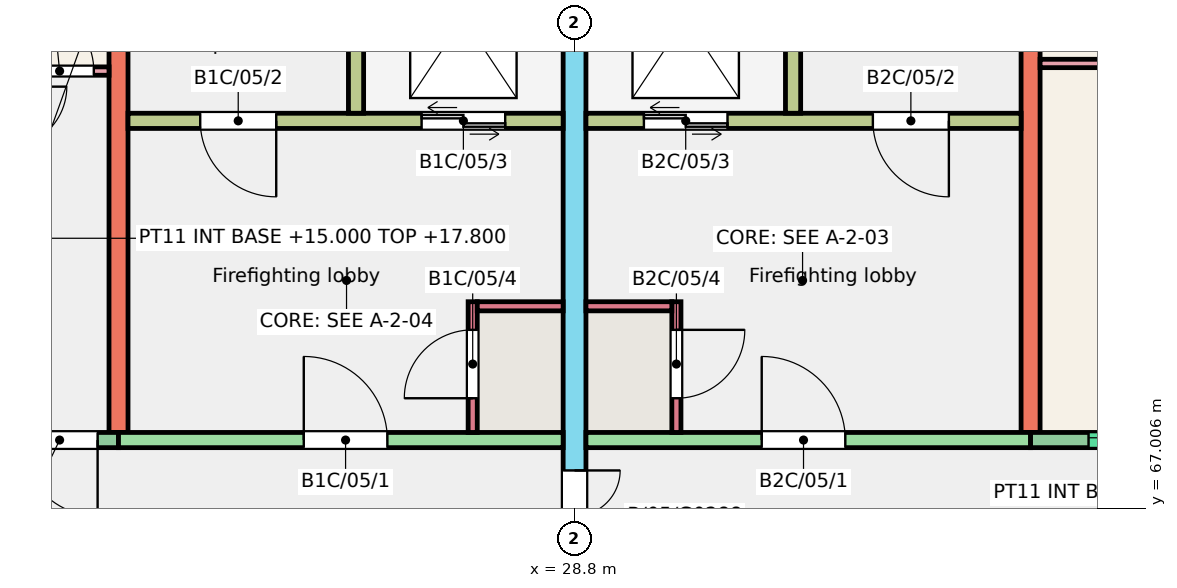
"""IFC4 building model, lengths in metres.
Left out: names, types, materials, properties, quantities, classifications, styles, units other than length and angle.
Written with IfcOpenShell. Run it as: python <this file> out.ifc"""

import sys

from ifc_helpers import new_model, si_unit, direction, frame, frame_2d, origin, place, context, subcontext, project, spatial, rectangle, extrude, element, fill, save


model = new_model("IFC4")
c1 = context("Model", 3, precision=1e-05, world=origin(), true_north=direction((0.0, 1.0)))
c2 = subcontext(c1, "Body", "Model", "MODEL_VIEW")
j1 = project(units=[si_unit("LENGTHUNIT", "METRE"), si_unit("PLANEANGLEUNIT", "RADIAN")], contexts=[c1])
p1 = place(None, origin())
s1 = spatial("IfcSite", under=j1, at=p1, CompositionType="ELEMENT")
p2 = place(p1, origin())
s2 = spatial("IfcBuilding", under=s1, at=p2, CompositionType="ELEMENT")
p3 = place(p2, frame((0.0, 0.0, 15.0)))
s3 = spatial("IfcBuildingStorey", under=s2, at=p3, CompositionType="ELEMENT", Elevation=15.0)
p4 = place(p3, frame((22.8, 68.0, 0.0), z_axis=(0.0, 0.0, 1.0), x_axis=(0.0, 1.0, 0.0)))
e1 = element("IfcWall", 1, at=p4, inside=s3, PredefinedType="SHEAR", context=c2, shape_type="SweptSolid", body=[
    extrude(rectangle(XDim=9.0, YDim=0.25, at=frame_2d((4.5, 0.0))), origin(), (0.0, 0.0, 1.0), 3.0),
])
p5 = place(p3, frame((28.8, 66.0, 0.0), z_axis=(0.0, 0.0, 1.0), x_axis=(0.0, 1.0, 0.0)))
e2 = element("IfcWall", 2, at=p5, inside=s3, PredefinedType="SHEAR", context=c2, shape_type="SweptSolid", body=[
    extrude(rectangle(XDim=11.0, YDim=0.3, at=frame_2d((5.5, 0.0))), origin(), (0.0, 0.0, 1.0), 3.0),
])
p6 = place(p5, frame((0.3, 0.0, 0.0)))
e3 = element("IfcOpeningElement", 3, at=p6, cuts=e2, PredefinedType="OPENING", context=c2, shape_type="SweptSolid", body=[
    extrude(rectangle(XDim=1.2, YDim=2.1, at=frame_2d((0.6, 1.05))), frame((0.0, 0.16, 0.0), z_axis=(0.0, -1.0, 0.0), x_axis=(1.0, 0.0, 0.0)), (0.0, 0.0, 1.0), 0.32),
])
p7 = place(p3, frame((34.8, 68.0, 0.0), z_axis=(0.0, 0.0, 1.0), x_axis=(0.0, 1.0, 0.0)))
e4 = element("IfcWall", 4, at=p7, inside=s3, PredefinedType="SHEAR", context=c2, shape_type="SweptSolid", body=[
    extrude(rectangle(XDim=9.0, YDim=0.25, at=frame_2d((4.5, 0.0))), origin(), (0.0, 0.0, 1.0), 3.0),
])
p8 = place(p3, frame((19.2, 67.9, 0.0), z_axis=(0.0, 0.0, 1.0), x_axis=(1.0, 0.0, 0.0)))
e5 = element("IfcWall", 5, at=p8, inside=s3, PredefinedType="SOLIDWALL", context=c2, shape_type="SweptSolid", body=[
    extrude(rectangle(XDim=3.6, YDim=0.2, at=frame_2d((1.8, 0.0))), origin(), (0.0, 0.0, 1.0), 3.0),
])
p9 = place(p8, frame((0.482, 0.0, 1.1)))
e6 = element("IfcOpeningElement", 6, at=p9, cuts=e5, PredefinedType="OPENING", context=c2, shape_type="SweptSolid", body=[
    extrude(rectangle(XDim=1.2, YDim=1.3, at=frame_2d((0.6, 0.65))), frame((0.0, 0.11, 0.0), z_axis=(0.0, -1.0, 0.0), x_axis=(1.0, 0.0, 0.0)), (0.0, 0.0, 1.0), 0.22),
])
p10 = place(p8, frame((2.325, 0.0, 0.0)))
e7 = element("IfcOpeningElement", 7, at=p10, cuts=e5, PredefinedType="OPENING", context=c2, shape_type="SweptSolid", body=[
    extrude(rectangle(XDim=1.0, YDim=2.1, at=frame_2d((0.5, 1.05))), frame((0.0, 0.11, 0.0), z_axis=(0.0, -1.0, 0.0), x_axis=(1.0, 0.0, 0.0)), (0.0, 0.0, 1.0), 0.22),
])
p11 = place(p3, frame((22.8, 67.9, 0.0), z_axis=(0.0, 0.0, 1.0), x_axis=(1.0, 0.0, 0.0)))
e8 = element("IfcWall", 8, at=p11, inside=s3, PredefinedType="SHEAR", context=c2, shape_type="SweptSolid", body=[
    extrude(rectangle(XDim=5.85, YDim=0.2, at=frame_2d((2.925, 0.0))), origin(), (0.0, 0.0, 1.0), 3.0),
])
p12 = place(p11, frame((2.438, 0.0, 0.0)))
e9 = element("IfcOpeningElement", 9, at=p12, cuts=e8, PredefinedType="OPENING", context=c2, shape_type="SweptSolid", body=[
    extrude(rectangle(XDim=1.1, YDim=2.1, at=frame_2d((0.55, 1.05))), frame((0.0, 0.11, 0.0), z_axis=(0.0, -1.0, 0.0), x_axis=(1.0, 0.0, 0.0)), (0.0, 0.0, 1.0), 0.22),
])
p13 = place(p3, frame((22.925, 72.1, 0.0), z_axis=(0.0, 0.0, 1.0), x_axis=(1.0, 0.0, 0.0)))
e10 = element("IfcWall", 10, at=p13, inside=s3, PredefinedType="SHEAR", context=c2, shape_type="SweptSolid", body=[
    extrude(rectangle(XDim=5.725, YDim=0.2, at=frame_2d((2.862, 0.0))), origin(), (0.0, 0.0, 1.0), 3.0),
])
p14 = place(p13, frame((0.95, 0.0, 0.0)))
e11 = element("IfcOpeningElement", 11, at=p14, cuts=e10, PredefinedType="OPENING", context=c2, shape_type="SweptSolid", body=[
    extrude(rectangle(XDim=1.0, YDim=2.1, at=frame_2d((0.5, 1.05))), frame((0.0, 0.11, 0.0), z_axis=(0.0, -1.0, 0.0), x_axis=(1.0, 0.0, 0.0)), (0.0, 0.0, 1.0), 0.22),
])
p15 = place(p13, frame((3.863, 0.0, 0.0)))
e12 = element("IfcOpeningElement", 12, at=p15, cuts=e10, PredefinedType="OPENING", context=c2, shape_type="SweptSolid", body=[
    extrude(rectangle(XDim=1.1, YDim=2.1, at=frame_2d((0.55, 1.05))), frame((0.0, 0.11, 0.0), z_axis=(0.0, -1.0, 0.0), x_axis=(1.0, 0.0, 0.0)), (0.0, 0.0, 1.0), 0.22),
])
p16 = place(p3, frame((25.925, 72.2, 0.0), z_axis=(0.0, 0.0, 1.0), x_axis=(0.0, 1.0, 0.0)))
e13 = element("IfcWall", 13, at=p16, inside=s3, PredefinedType="SHEAR", context=c2, shape_type="SweptSolid", body=[
    extrude(rectangle(XDim=4.8, YDim=0.2, at=frame_2d((2.4, 0.0))), origin(), (0.0, 0.0, 1.0), 3.0),
])
p17 = place(p3, frame((27.46, 68.0, 0.0), z_axis=(0.0, 0.0, 1.0), x_axis=(0.0, 1.0, 0.0)))
e14 = element("IfcWall", 14, at=p17, inside=s3, PredefinedType="SHEAR", context=c2, shape_type="SweptSolid", body=[
    extrude(rectangle(XDim=1.72, YDim=0.12, at=frame_2d((0.86, 0.0))), origin(), (0.0, 0.0, 1.0), 3.0),
])
p18 = place(p17, frame((0.45, 0.0, 0.0)))
e15 = element("IfcOpeningElement", 15, at=p18, cuts=e14, PredefinedType="OPENING", context=c2, shape_type="SweptSolid", body=[
    extrude(rectangle(XDim=0.9, YDim=2.1, at=frame_2d((0.45, 1.05))), frame((0.0, 0.07, 0.0), z_axis=(0.0, -1.0, 0.0), x_axis=(1.0, 0.0, 0.0)), (0.0, 0.0, 1.0), 0.14),
])
p19 = place(p3, frame((27.52, 69.66, 0.0), z_axis=(0.0, 0.0, 1.0), x_axis=(1.0, 0.0, 0.0)))
e16 = element("IfcWall", 16, at=p19, inside=s3, PredefinedType="SHEAR", context=c2, shape_type="SweptSolid", body=[
    extrude(rectangle(XDim=1.13, YDim=0.12, at=frame_2d((0.565, 0.0))), origin(), (0.0, 0.0, 1.0), 3.0),
])
p20 = place(p3, frame((28.95, 67.9, 0.0), z_axis=(0.0, 0.0, 1.0), x_axis=(1.0, 0.0, 0.0)))
e17 = element("IfcWall", 17, at=p20, inside=s3, PredefinedType="SHEAR", context=c2, shape_type="SweptSolid", body=[
    extrude(rectangle(XDim=5.85, YDim=0.2, at=frame_2d((2.925, 0.0))), origin(), (0.0, 0.0, 1.0), 3.0),
])
p21 = place(p20, frame((2.312, 0.0, 0.0)))
e18 = element("IfcOpeningElement", 18, at=p21, cuts=e17, PredefinedType="OPENING", context=c2, shape_type="SweptSolid", body=[
    extrude(rectangle(XDim=1.1, YDim=2.1, at=frame_2d((0.55, 1.05))), frame((0.0, 0.11, 0.0), z_axis=(0.0, -1.0, 0.0), x_axis=(1.0, 0.0, 0.0)), (0.0, 0.0, 1.0), 0.22),
])
p22 = place(p3, frame((28.95, 72.1, 0.0), z_axis=(0.0, 0.0, 1.0), x_axis=(1.0, 0.0, 0.0)))
e19 = element("IfcWall", 19, at=p22, inside=s3, PredefinedType="SHEAR", context=c2, shape_type="SweptSolid", body=[
    extrude(rectangle(XDim=5.725, YDim=0.2, at=frame_2d((2.863, 0.0))), origin(), (0.0, 0.0, 1.0), 3.0),
])
p23 = place(p22, frame((3.775, 0.0, 0.0)))
e20 = element("IfcOpeningElement", 20, at=p23, cuts=e19, PredefinedType="OPENING", context=c2, shape_type="SweptSolid", body=[
    extrude(rectangle(XDim=1.0, YDim=2.1, at=frame_2d((0.5, 1.05))), frame((0.0, 0.11, 0.0), z_axis=(0.0, -1.0, 0.0), x_axis=(1.0, 0.0, 0.0)), (0.0, 0.0, 1.0), 0.22),
])
p24 = place(p22, frame((0.762, 0.0, 0.0)))
e21 = element("IfcOpeningElement", 21, at=p24, cuts=e19, PredefinedType="OPENING", context=c2, shape_type="SweptSolid", body=[
    extrude(rectangle(XDim=1.1, YDim=2.1, at=frame_2d((0.55, 1.05))), frame((0.0, 0.11, 0.0), z_axis=(0.0, -1.0, 0.0), x_axis=(1.0, 0.0, 0.0)), (0.0, 0.0, 1.0), 0.22),
])
p25 = place(p3, frame((31.675, 72.2, 0.0), z_axis=(0.0, 0.0, 1.0), x_axis=(0.0, 1.0, 0.0)))
e22 = element("IfcWall", 22, at=p25, inside=s3, PredefinedType="SHEAR", context=c2, shape_type="SweptSolid", body=[
    extrude(rectangle(XDim=4.8, YDim=0.2, at=frame_2d((2.4, 0.0))), origin(), (0.0, 0.0, 1.0), 3.0),
])
p26 = place(p3, frame((30.14, 68.0, 0.0), z_axis=(0.0, 0.0, 1.0), x_axis=(0.0, 1.0, 0.0)))
e23 = element("IfcWall", 23, at=p26, inside=s3, PredefinedType="SHEAR", context=c2, shape_type="SweptSolid", body=[
    extrude(rectangle(XDim=1.72, YDim=0.12, at=frame_2d((0.86, 0.0))), origin(), (0.0, 0.0, 1.0), 3.0),
])
p27 = place(p26, frame((0.45, 0.0, 0.0)))
e24 = element("IfcOpeningElement", 24, at=p27, cuts=e23, PredefinedType="OPENING", context=c2, shape_type="SweptSolid", body=[
    extrude(rectangle(XDim=0.9, YDim=2.1, at=frame_2d((0.45, 1.05))), frame((0.0, 0.07, 0.0), z_axis=(0.0, -1.0, 0.0), x_axis=(1.0, 0.0, 0.0)), (0.0, 0.0, 1.0), 0.14),
])
p28 = place(p3, frame((28.95, 69.66, 0.0), z_axis=(0.0, 0.0, 1.0), x_axis=(1.0, 0.0, 0.0)))
e25 = element("IfcWall", 25, at=p28, inside=s3, PredefinedType="SHEAR", context=c2, shape_type="SweptSolid", body=[
    extrude(rectangle(XDim=1.13, YDim=0.12, at=frame_2d((0.565, 0.0))), origin(), (0.0, 0.0, 1.0), 3.0),
])
p29 = place(p3, frame((34.8, 67.9, 0.0), z_axis=(0.0, 0.0, 1.0), x_axis=(1.0, 0.0, 0.0)))
e26 = element("IfcWall", 26, at=p29, inside=s3, PredefinedType="SOLIDWALL", context=c2, shape_type="SweptSolid", body=[
    extrude(rectangle(XDim=3.6, YDim=0.2, at=frame_2d((1.8, 0.0))), origin(), (0.0, 0.0, 1.0), 3.0),
])
p30 = place(p29, frame((0.762, 0.0, 1.2)))
e27 = element("IfcOpeningElement", 27, at=p30, cuts=e26, PredefinedType="OPENING", context=c2, shape_type="SweptSolid", body=[
    extrude(rectangle(XDim=2.1, YDim=1.2, at=frame_2d((1.05, 0.6))), frame((0.0, 0.11, 0.0), z_axis=(0.0, -1.0, 0.0), x_axis=(1.0, 0.0, 0.0)), (0.0, 0.0, 1.0), 0.22),
])
p31 = place(p3, frame((19.3, 72.755, 0.0), z_axis=(0.0, 0.0, 1.0), x_axis=(1.0, 0.0, 0.0)))
e28 = element("IfcWall", 28, at=p31, inside=s3, PredefinedType="PARTITIONING", context=c2, shape_type="SweptSolid", body=[
    extrude(rectangle(XDim=3.375, YDim=0.11, at=frame_2d((1.688, 0.0))), origin(), (0.0, 0.0, 1.0), 2.8),
])
p32 = place(p31, frame((2.275, 0.0, 0.0)))
e29 = element("IfcOpeningElement", 29, at=p32, cuts=e28, PredefinedType="OPENING", context=c2, shape_type="SweptSolid", body=[
    extrude(rectangle(XDim=0.9, YDim=2.1, at=frame_2d((0.45, 1.05))), frame((0.0, 0.065, 0.0), z_axis=(0.0, -1.0, 0.0), x_axis=(1.0, 0.0, 0.0)), (0.0, 0.0, 1.0), 0.13),
])
p33 = place(p3, frame((34.925, 72.855, 0.0), z_axis=(0.0, 0.0, 1.0), x_axis=(1.0, 0.0, 0.0)))
e30 = element("IfcWall", 30, at=p33, inside=s3, PredefinedType="PARTITIONING", context=c2, shape_type="SweptSolid", body=[
    extrude(rectangle(XDim=3.375, YDim=0.11, at=frame_2d((1.688, 0.0))), origin(), (0.0, 0.0, 1.0), 2.8),
])
p34 = place(p30, origin())
e31 = element("IfcWindow", 31, at=p34, inside=s3, PartitioningType="SINGLE_PANEL", PredefinedType="WINDOW", context=c2, shape_type="SweptSolid", body=[
    extrude(rectangle(XDim=2.1, YDim=1.2, at=frame_2d((1.05, 0.6))), frame((0.0, 0.06, 0.0), z_axis=(0.0, -1.0, 0.0), x_axis=(1.0, 0.0, 0.0)), (0.0, 0.0, 1.0), 0.06),
])
fill(e27, e31)
p35 = place(p10, origin())
e32 = element("IfcDoor", 32, at=p35, inside=s3, OperationType="SINGLE_SWING_RIGHT", PredefinedType="DOOR", context=c2, shape_type="SweptSolid", body=[
    extrude(rectangle(XDim=1.0, YDim=2.1, at=frame_2d((0.5, 1.05))), frame((0.0, 0.025, 0.0), z_axis=(0.0, -1.0, 0.0), x_axis=(1.0, 0.0, 0.0)), (0.0, 0.0, 1.0), 0.05),
])
fill(e7, e32)
p36 = place(p32, origin())
e33 = element("IfcDoor", 33, at=p36, inside=s3, OperationType="SINGLE_SWING_LEFT", PredefinedType="DOOR", context=c2, shape_type="SweptSolid", body=[
    extrude(rectangle(XDim=0.9, YDim=2.1, at=frame_2d((0.45, 1.05))), frame((0.0, 0.025, 0.0), z_axis=(0.0, -1.0, 0.0), x_axis=(1.0, 0.0, 0.0)), (0.0, 0.0, 1.0), 0.05),
])
fill(e29, e33)
p37 = place(p12, origin())
e34 = element("IfcDoor", 34, at=p37, inside=s3, OperationType="SINGLE_SWING_LEFT", PredefinedType="DOOR", context=c2, shape_type="SweptSolid", body=[
    extrude(rectangle(XDim=1.1, YDim=2.1, at=frame_2d((0.55, 1.05))), frame((0.0, 0.025, 0.0), z_axis=(0.0, -1.0, 0.0), x_axis=(1.0, 0.0, 0.0)), (0.0, 0.0, 1.0), 0.05),
])
fill(e9, e34)
p38 = place(p14, origin())
e35 = element("IfcDoor", 35, at=p38, inside=s3, OperationType="SINGLE_SWING_RIGHT", PredefinedType="DOOR", context=c2, shape_type="SweptSolid", body=[
    extrude(rectangle(XDim=1.0, YDim=2.1, at=frame_2d((0.5, 1.05))), frame((0.0, 0.025, 0.0), z_axis=(0.0, -1.0, 0.0), x_axis=(1.0, 0.0, 0.0)), (0.0, 0.0, 1.0), 0.05),
])
fill(e11, e35)
p39 = place(p15, origin())
e36 = element("IfcDoor", 36, at=p39, inside=s3, OperationType="DOUBLE_DOOR_SLIDING", PredefinedType="DOOR", context=c2, shape_type="SweptSolid", body=[
    extrude(rectangle(XDim=1.1, YDim=2.1, at=frame_2d((0.55, 1.05))), frame((0.0, 0.025, 0.0), z_axis=(0.0, -1.0, 0.0), x_axis=(1.0, 0.0, 0.0)), (0.0, 0.0, 1.0), 0.05),
])
fill(e12, e36)
p40 = place(p18, origin())
e37 = element("IfcDoor", 37, at=p40, inside=s3, OperationType="SINGLE_SWING_LEFT", PredefinedType="DOOR", context=c2, shape_type="SweptSolid", body=[
    extrude(rectangle(XDim=0.9, YDim=2.1, at=frame_2d((0.45, 1.05))), frame((0.0, 0.025, 0.0), z_axis=(0.0, -1.0, 0.0), x_axis=(1.0, 0.0, 0.0)), (0.0, 0.0, 1.0), 0.05),
])
fill(e15, e37)
p41 = place(p21, origin())
e38 = element("IfcDoor", 38, at=p41, inside=s3, OperationType="SINGLE_SWING_LEFT", PredefinedType="DOOR", context=c2, shape_type="SweptSolid", body=[
    extrude(rectangle(XDim=1.1, YDim=2.1, at=frame_2d((0.55, 1.05))), frame((0.0, 0.025, 0.0), z_axis=(0.0, -1.0, 0.0), x_axis=(1.0, 0.0, 0.0)), (0.0, 0.0, 1.0), 0.05),
])
fill(e18, e38)
p42 = place(p23, origin())
e39 = element("IfcDoor", 39, at=p42, inside=s3, OperationType="SINGLE_SWING_RIGHT", PredefinedType="DOOR", context=c2, shape_type="SweptSolid", body=[
    extrude(rectangle(XDim=1.0, YDim=2.1, at=frame_2d((0.5, 1.05))), frame((0.0, 0.025, 0.0), z_axis=(0.0, -1.0, 0.0), x_axis=(1.0, 0.0, 0.0)), (0.0, 0.0, 1.0), 0.05),
])
fill(e20, e39)
p43 = place(p24, origin())
e40 = element("IfcDoor", 40, at=p43, inside=s3, OperationType="DOUBLE_DOOR_SLIDING", PredefinedType="DOOR", context=c2, shape_type="SweptSolid", body=[
    extrude(rectangle(XDim=1.1, YDim=2.1, at=frame_2d((0.55, 1.05))), frame((0.0, 0.025, 0.0), z_axis=(0.0, -1.0, 0.0), x_axis=(1.0, 0.0, 0.0)), (0.0, 0.0, 1.0), 0.05),
])
fill(e21, e40)
p44 = place(p27, origin())
e41 = element("IfcDoor", 41, at=p44, inside=s3, OperationType="SINGLE_SWING_RIGHT", PredefinedType="DOOR", context=c2, shape_type="SweptSolid", body=[
    extrude(rectangle(XDim=0.9, YDim=2.1, at=frame_2d((0.45, 1.05))), frame((0.0, 0.025, 0.0), z_axis=(0.0, -1.0, 0.0), x_axis=(1.0, 0.0, 0.0)), (0.0, 0.0, 1.0), 0.05),
])
fill(e24, e41)
p45 = place(p6, origin())
e42 = element("IfcDoor", 42, at=p45, inside=s3, OperationType="DOUBLE_DOOR_SINGLE_SWING", PredefinedType="DOOR", context=c2, shape_type="SweptSolid", body=[
    extrude(rectangle(XDim=1.2, YDim=2.1, at=frame_2d((0.6, 1.05))), frame((0.0, 0.025, 0.0), z_axis=(0.0, -1.0, 0.0), x_axis=(1.0, 0.0, 0.0)), (0.0, 0.0, 1.0), 0.05),
])
fill(e3, e42)
save(model, sys.argv[1])
